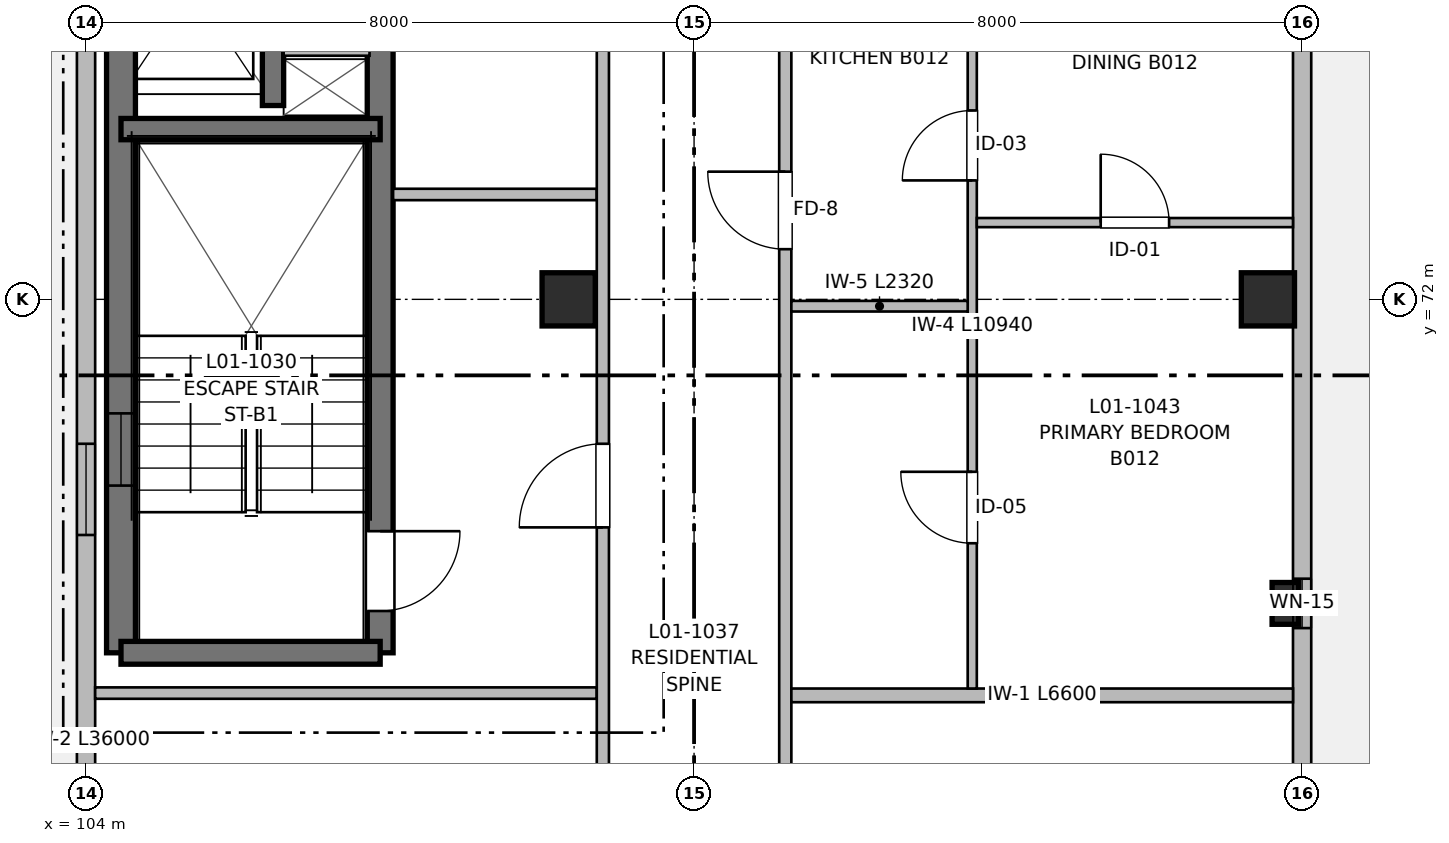
"""IFC4 building model, lengths in metres.
Left out: names, types, materials, properties, quantities, classifications, styles, units other than length and angle.
Written with IfcOpenShell. Run it as: python <this file> out.ifc"""

import sys

from ifc_helpers import new_model, si_unit, direction, frame, frame_2d, origin, origin_2d, place, context, subcontext, project, spatial, rectangle, extrude, element, fill, save


model = new_model("IFC4")
c1 = context("Model", 3, precision=1e-05, world=origin(), true_north=direction((0.0, 1.0)))
c2 = subcontext(c1, "Body", "Model", "MODEL_VIEW")
j1 = project(units=[si_unit("LENGTHUNIT", "METRE"), si_unit("PLANEANGLEUNIT", "RADIAN")], contexts=[c1])
p1 = place(None, origin())
s1 = spatial("IfcSite", under=j1, at=p1, CompositionType="ELEMENT")
p2 = place(p1, origin())
s2 = spatial("IfcBuilding", under=s1, at=p2, CompositionType="ELEMENT")
p3 = place(p2, frame((0.0, 0.0, 4.16)))
s3 = spatial("IfcBuildingStorey", under=s2, at=p3, CompositionType="ELEMENT", Elevation=4.16)
for number, where, z_axis, x_axis in (
    (1, (110.35, 72.0, 0.0), (0.0, 0.0, 1.0), (1.0, 0.0, 0.0)),
    (2, (119.55, 72.0, 0.0), (0.0, 0.0, 1.0), (1.0, 0.0, 0.0)),
):
    element("IfcColumn", number, at=place(p3, frame(where, z_axis=z_axis, x_axis=x_axis)), inside=s3, PredefinedType="COLUMN", context=c2, shape_type="SweptSolid", body=[
        extrude(rectangle(XDim=0.7, YDim=0.7, at=origin_2d()), origin(), (0.0, 0.0, 1.0), 3.2),
    ])
p4 = place(p3, frame((119.78, 68.0, 0.0), z_axis=(0.0, 0.0, 1.0), x_axis=(1.0, 0.0, 0.0)))
e3 = element("IfcColumn", 3, at=p4, inside=s3, PredefinedType="PILASTER", context=c2, shape_type="SweptSolid", body=[
    extrude(rectangle(XDim=0.35, YDim=0.55, at=origin_2d()), origin(), (0.0, 0.0, 1.0), 3.2),
])
p5 = place(p3, frame((104.46, 67.35, 0.0), z_axis=(0.0, 0.0, 1.0), x_axis=(0.0, 1.0, 0.0)))
e4 = element("IfcWall", 4, at=p5, inside=s3, PredefinedType="SHEAR", context=c2, shape_type="SweptSolid", body=[
    extrude(rectangle(XDim=12.45, YDim=0.38, at=frame_2d((6.225, 0.0))), origin(), (0.0, 0.0, 1.0), 3.2),
])
p6 = place(p5, frame((2.2, 0.0, 0.97)))
e5 = element("IfcOpeningElement", 5, at=p6, cuts=e4, PredefinedType="OPENING", context=c2, shape_type="SweptSolid", body=[
    extrude(rectangle(XDim=0.95, YDim=1.25, at=frame_2d((0.475, 0.625))), frame((0.0, 0.2, 0.0), z_axis=(0.0, -1.0, 0.0), x_axis=(1.0, 0.0, 0.0)), (0.0, 0.0, 1.0), 0.4),
])
p7 = place(p3, frame((107.87, 79.8, 0.0), z_axis=(0.0, 0.0, 1.0), x_axis=(0.0, -1.0, 0.0)))
e6 = element("IfcWall", 6, at=p7, inside=s3, PredefinedType="SHEAR", context=c2, shape_type="SweptSolid", body=[
    extrude(rectangle(XDim=12.45, YDim=0.34, at=frame_2d((6.225, 0.0))), origin(), (0.0, 0.0, 1.0), 3.2),
])
p8 = place(p7, frame((10.85, 0.0, 0.0)))
e7 = element("IfcOpeningElement", 7, at=p8, cuts=e6, PredefinedType="OPENING", context=c2, shape_type="SweptSolid", body=[
    extrude(rectangle(XDim=1.05, YDim=2.15, at=frame_2d((0.525, 1.075))), frame((0.0, 0.18, 0.0), z_axis=(0.0, -1.0, 0.0), x_axis=(1.0, 0.0, 0.0)), (0.0, 0.0, 1.0), 0.36),
])
p9 = place(p3, frame((107.87, 67.35, 0.0), z_axis=(0.0, 0.0, 1.0), x_axis=(-1.0, 0.0, 0.0)))
e8 = element("IfcWall", 8, at=p9, inside=s3, PredefinedType="SHEAR", context=c2, shape_type="SweptSolid", body=[
    extrude(rectangle(XDim=3.41, YDim=0.3, at=frame_2d((1.705, 0.0))), origin(), (0.0, 0.0, 1.0), 3.2),
])
p10 = place(p3, frame((104.46, 74.24, 0.0), z_axis=(0.0, 0.0, 1.0), x_axis=(1.0, 0.0, 0.0)))
e9 = element("IfcWall", 9, at=p10, inside=s3, PredefinedType="SHEAR", context=c2, shape_type="SweptSolid", body=[
    extrude(rectangle(XDim=3.41, YDim=0.28, at=frame_2d((1.705, 0.0))), origin(), (0.0, 0.0, 1.0), 3.2),
])
p11 = place(p3, frame((106.46, 74.55, 0.0), z_axis=(0.0, 0.0, 1.0), x_axis=(0.0, 1.0, 0.0)))
e10 = element("IfcWall", 10, at=p11, inside=s3, PredefinedType="SHEAR", context=c2, shape_type="SweptSolid", body=[
    extrude(rectangle(XDim=5.25, YDim=0.28, at=frame_2d((2.625, 0.0))), origin(), (0.0, 0.0, 1.0), 3.2),
])
p12 = place(p11, frame((1.15, 0.0, 0.0)))
e11 = element("IfcOpeningElement", 11, at=p12, cuts=e10, PredefinedType="OPENING", context=c2, shape_type="SweptSolid", body=[
    extrude(rectangle(XDim=1.0, YDim=2.15, at=frame_2d((0.5, 1.075))), frame((0.0, 0.15, 0.0), z_axis=(0.0, -1.0, 0.0), x_axis=(1.0, 0.0, 0.0)), (0.0, 0.0, 1.0), 0.3),
])
p13 = place(p11, frame((3.85, 0.0, 0.0)))
e12 = element("IfcOpeningElement", 12, at=p13, cuts=e10, PredefinedType="OPENING", context=c2, shape_type="SweptSolid", body=[
    extrude(rectangle(XDim=0.9, YDim=2.15, at=frame_2d((0.45, 1.075))), frame((0.0, 0.15, 0.0), z_axis=(0.0, -1.0, 0.0), x_axis=(1.0, 0.0, 0.0)), (0.0, 0.0, 1.0), 0.3),
])
p14 = place(p3, frame((106.6, 75.28, 0.0), z_axis=(0.0, 0.0, 1.0), x_axis=(1.0, 0.0, 0.0)))
e13 = element("IfcWall", 13, at=p14, inside=s3, PredefinedType="PARTITIONING", context=c2, shape_type="SweptSolid", body=[
    extrude(rectangle(XDim=1.13, YDim=0.15, at=frame_2d((0.565, 0.0))), origin(), (0.0, 0.0, 1.0), 2.95),
])
p15 = place(p3, frame((120.0, 88.0, 0.0), z_axis=(0.0, 0.0, 1.0), x_axis=(0.0, -1.0, 0.0)))
e14 = element("IfcWall", 14, at=p15, inside=s3, PredefinedType="SOLIDWALL", context=c2, shape_type="SweptSolid", body=[
    extrude(rectangle(XDim=32.0, YDim=0.24, at=frame_2d((16.0, 0.0))), origin(), (0.0, 0.0, 1.0), 2.98),
])
p16 = place(p15, frame((2.0, 0.0, 0.0)))
e15 = element("IfcOpeningElement", 15, at=p16, cuts=e14, PredefinedType="OPENING", context=c2, shape_type="SweptSolid", body=[
    extrude(rectangle(XDim=1.2, YDim=2.2, at=frame_2d((0.6, 1.1))), frame((0.0, 0.13, 0.0), z_axis=(0.0, -1.0, 0.0), x_axis=(1.0, 0.0, 0.0)), (0.0, 0.0, 1.0), 0.26),
])
p17 = place(p15, frame((11.4, 0.0, 0.9)))
e16 = element("IfcOpeningElement", 16, at=p17, cuts=e14, PredefinedType="OPENING", context=c2, shape_type="SweptSolid", body=[
    extrude(rectangle(XDim=1.2, YDim=1.05, at=frame_2d((0.6, 0.525))), frame((0.0, 0.13, 0.0), z_axis=(0.0, -1.0, 0.0), x_axis=(1.0, 0.0, 0.0)), (0.0, 0.0, 1.0), 0.26),
])
p18 = place(p15, frame((19.675, 0.0, 0.9)))
e17 = element("IfcOpeningElement", 17, at=p18, cuts=e14, PredefinedType="OPENING", context=c2, shape_type="SweptSolid", body=[
    extrude(rectangle(XDim=0.65, YDim=0.95, at=frame_2d((0.325, 0.475))), frame((0.0, 0.13, 0.0), z_axis=(0.0, -1.0, 0.0), x_axis=(1.0, 0.0, 0.0)), (0.0, 0.0, 1.0), 0.26),
])
p19 = place(p15, frame((27.45, 0.0, 0.62)))
e18 = element("IfcOpeningElement", 18, at=p19, cuts=e14, PredefinedType="OPENING", context=c2, shape_type="SweptSolid", body=[
    extrude(rectangle(XDim=1.1, YDim=1.6, at=frame_2d((0.55, 0.8))), frame((0.0, 0.13, 0.0), z_axis=(0.0, -1.0, 0.0), x_axis=(1.0, 0.0, 0.0)), (0.0, 0.0, 1.0), 0.26),
])
p20 = place(p15, frame((6.299, 0.0, 0.87)))
e19 = element("IfcOpeningElement", 19, at=p20, cuts=e14, PredefinedType="OPENING", context=c2, shape_type="SweptSolid", body=[
    extrude(rectangle(XDim=1.25, YDim=1.35, at=frame_2d((0.625, 0.675))), frame((0.0, 0.13, 0.0), z_axis=(0.0, -1.0, 0.0), x_axis=(1.0, 0.0, 0.0)), (0.0, 0.0, 1.0), 0.26),
])
p21 = place(p3, frame((104.0, 56.0, 0.0), z_axis=(0.0, 0.0, 1.0), x_axis=(0.0, 1.0, 0.0)))
e20 = element("IfcWall", 20, at=p21, inside=s3, PredefinedType="SOLIDWALL", context=c2, shape_type="SweptSolid", body=[
    extrude(rectangle(XDim=36.0, YDim=0.24, at=frame_2d((18.0, 0.0))), origin(), (0.0, 0.0, 1.0), 2.98),
])
p22 = place(p21, frame((3.9, 0.0, 0.0)))
e21 = element("IfcOpeningElement", 21, at=p22, cuts=e20, PredefinedType="OPENING", context=c2, shape_type="SweptSolid", body=[
    extrude(rectangle(XDim=1.2, YDim=2.2, at=frame_2d((0.6, 1.1))), frame((0.0, 0.13, 0.0), z_axis=(0.0, -1.0, 0.0), x_axis=(1.0, 0.0, 0.0)), (0.0, 0.0, 1.0), 0.26),
])
p23 = place(p21, frame((5.8, 0.0, 0.72)))
e22 = element("IfcOpeningElement", 22, at=p23, cuts=e20, PredefinedType="OPENING", context=c2, shape_type="SweptSolid", body=[
    extrude(rectangle(XDim=1.7, YDim=1.5, at=frame_2d((0.85, 0.75))), frame((0.0, 0.13, 0.0), z_axis=(0.0, -1.0, 0.0), x_axis=(1.0, 0.0, 0.0)), (0.0, 0.0, 1.0), 0.26),
])
p24 = place(p21, frame((12.9, 0.0, 0.9)))
e23 = element("IfcOpeningElement", 23, at=p24, cuts=e20, PredefinedType="OPENING", context=c2, shape_type="SweptSolid", body=[
    extrude(rectangle(XDim=1.2, YDim=1.05, at=frame_2d((0.6, 0.525))), frame((0.0, 0.13, 0.0), z_axis=(0.0, -1.0, 0.0), x_axis=(1.0, 0.0, 0.0)), (0.0, 0.0, 1.0), 0.26),
])
p25 = place(p21, frame((22.175, 0.0, 0.9)))
e24 = element("IfcOpeningElement", 24, at=p25, cuts=e20, PredefinedType="OPENING", context=c2, shape_type="SweptSolid", body=[
    extrude(rectangle(XDim=0.65, YDim=0.95, at=frame_2d((0.325, 0.475))), frame((0.0, 0.13, 0.0), z_axis=(0.0, -1.0, 0.0), x_axis=(1.0, 0.0, 0.0)), (0.0, 0.0, 1.0), 0.26),
])
p26 = place(p21, frame((30.95, 0.0, 0.62)))
e25 = element("IfcOpeningElement", 25, at=p26, cuts=e20, PredefinedType="OPENING", context=c2, shape_type="SweptSolid", body=[
    extrude(rectangle(XDim=1.1, YDim=1.6, at=frame_2d((0.55, 0.8))), frame((0.0, 0.13, 0.0), z_axis=(0.0, -1.0, 0.0), x_axis=(1.0, 0.0, 0.0)), (0.0, 0.0, 1.0), 0.26),
])
p27 = place(p3, frame((104.12, 66.82, 0.0), z_axis=(0.0, 0.0, 1.0), x_axis=(1.0, 0.0, 0.0)))
e26 = element("IfcWall", 26, at=p27, inside=s3, PredefinedType="PARTITIONING", context=c2, shape_type="SweptSolid", body=[
    extrude(rectangle(XDim=6.6, YDim=0.15, at=frame_2d((3.3, 0.0))), origin(), (0.0, 0.0, 1.0), 2.935),
])
p28 = place(p3, frame((108.04, 73.38, 0.0), z_axis=(0.0, 0.0, 1.0), x_axis=(1.0, 0.0, 0.0)))
e27 = element("IfcWall", 27, at=p28, inside=s3, PredefinedType="PARTITIONING", context=c2, shape_type="SweptSolid", body=[
    extrude(rectangle(XDim=2.68, YDim=0.15, at=frame_2d((1.34, 0.0))), origin(), (0.0, 0.0, 1.0), 2.935),
])
p29 = place(p3, frame((110.8, 56.18, 0.0), z_axis=(0.0, 0.0, 1.0), x_axis=(0.0, 1.0, 0.0)))
e28 = element("IfcWall", 28, at=p29, inside=s3, PredefinedType="PARTITIONING", context=c2, shape_type="SweptSolid", body=[
    extrude(rectangle(XDim=50.62, YDim=0.16, at=frame_2d((25.31, 0.0))), origin(), (0.0, 0.0, 1.0), 2.935),
])
p30 = place(p29, frame((12.82, 0.0, 0.0)))
e29 = element("IfcOpeningElement", 29, at=p30, cuts=e28, PredefinedType="OPENING", context=c2, shape_type="SweptSolid", body=[
    extrude(rectangle(XDim=1.1, YDim=2.15, at=frame_2d((0.55, 1.075))), frame((0.0, 0.09, 0.0), z_axis=(0.0, -1.0, 0.0), x_axis=(1.0, 0.0, 0.0)), (0.0, 0.0, 1.0), 0.18),
])
p31 = place(p29, frame((19.22, 0.0, 0.0)))
e30 = element("IfcOpeningElement", 30, at=p31, cuts=e28, PredefinedType="OPENING", context=c2, shape_type="SweptSolid", body=[
    extrude(rectangle(XDim=1.6, YDim=2.15, at=frame_2d((0.8, 1.075))), frame((0.0, 0.09, 0.0), z_axis=(0.0, -1.0, 0.0), x_axis=(1.0, 0.0, 0.0)), (0.0, 0.0, 1.0), 0.18),
])
p32 = place(p29, frame((1.8, 0.0, 0.0)))
e31 = element("IfcOpeningElement", 31, at=p32, cuts=e28, PredefinedType="OPENING", context=c2, shape_type="SweptSolid", body=[
    extrude(rectangle(XDim=0.96, YDim=2.15, at=frame_2d((0.48, 1.075))), frame((0.0, 0.09, 0.0), z_axis=(0.0, -1.0, 0.0), x_axis=(1.0, 0.0, 0.0)), (0.0, 0.0, 1.0), 0.18),
])
p33 = place(p29, frame((32.725, 0.0, 0.0)))
e32 = element("IfcOpeningElement", 32, at=p33, cuts=e28, PredefinedType="OPENING", context=c2, shape_type="SweptSolid", body=[
    extrude(rectangle(XDim=0.98, YDim=2.15, at=frame_2d((0.49, 1.075))), frame((0.0, 0.09, 0.0), z_axis=(0.0, -1.0, 0.0), x_axis=(1.0, 0.0, 0.0)), (0.0, 0.0, 1.0), 0.18),
])
p34 = place(p29, frame((40.935, 0.0, 0.0)))
e33 = element("IfcOpeningElement", 33, at=p34, cuts=e28, PredefinedType="OPENING", context=c2, shape_type="SweptSolid", body=[
    extrude(rectangle(XDim=0.98, YDim=2.15, at=frame_2d((0.49, 1.075))), frame((0.0, 0.09, 0.0), z_axis=(0.0, -1.0, 0.0), x_axis=(1.0, 0.0, 0.0)), (0.0, 0.0, 1.0), 0.18),
])
p35 = place(p3, frame((113.2, 56.18, 0.0), z_axis=(0.0, 0.0, 1.0), x_axis=(0.0, 1.0, 0.0)))
e34 = element("IfcWall", 34, at=p35, inside=s3, PredefinedType="PARTITIONING", context=c2, shape_type="SweptSolid", body=[
    extrude(rectangle(XDim=50.62, YDim=0.16, at=frame_2d((25.31, 0.0))), origin(), (0.0, 0.0, 1.0), 2.935),
])
p36 = place(p35, frame((4.51, 0.0, 0.0)))
e35 = element("IfcOpeningElement", 35, at=p36, cuts=e34, PredefinedType="OPENING", context=c2, shape_type="SweptSolid", body=[
    extrude(rectangle(XDim=1.5, YDim=2.2, at=frame_2d((0.75, 1.1))), frame((0.0, 0.09, 0.0), z_axis=(0.0, -1.0, 0.0), x_axis=(1.0, 0.0, 0.0)), (0.0, 0.0, 1.0), 0.18),
])
p37 = place(p35, frame((16.48, 0.0, 0.0)))
e36 = element("IfcOpeningElement", 36, at=p37, cuts=e34, PredefinedType="OPENING", context=c2, shape_type="SweptSolid", body=[
    extrude(rectangle(XDim=1.02, YDim=2.15, at=frame_2d((0.51, 1.075))), frame((0.0, 0.09, 0.0), z_axis=(0.0, -1.0, 0.0), x_axis=(1.0, 0.0, 0.0)), (0.0, 0.0, 1.0), 0.18),
])
p38 = place(p35, frame((28.53, 0.0, 0.0)))
e37 = element("IfcOpeningElement", 37, at=p38, cuts=e34, PredefinedType="OPENING", context=c2, shape_type="SweptSolid", body=[
    extrude(rectangle(XDim=0.98, YDim=2.15, at=frame_2d((0.49, 1.075))), frame((0.0, 0.09, 0.0), z_axis=(0.0, -1.0, 0.0), x_axis=(1.0, 0.0, 0.0)), (0.0, 0.0, 1.0), 0.18),
])
p39 = place(p35, frame((42.88, 0.0, 0.0)))
e38 = element("IfcOpeningElement", 38, at=p39, cuts=e34, PredefinedType="OPENING", context=c2, shape_type="SweptSolid", body=[
    extrude(rectangle(XDim=0.98, YDim=2.15, at=frame_2d((0.49, 1.075))), frame((0.0, 0.09, 0.0), z_axis=(0.0, -1.0, 0.0), x_axis=(1.0, 0.0, 0.0)), (0.0, 0.0, 1.0), 0.18),
])
p40 = place(p3, frame((113.28, 66.79, 0.0), z_axis=(0.0, 0.0, 1.0), x_axis=(1.0, 0.0, 0.0)))
e39 = element("IfcWall", 39, at=p40, inside=s3, PredefinedType="PARTITIONING", context=c2, shape_type="SweptSolid", body=[
    extrude(rectangle(XDim=6.6, YDim=0.18, at=frame_2d((3.3, 0.0))), origin(), (0.0, 0.0, 1.0), 2.935),
])
p41 = place(p3, frame((115.66, 66.88, 0.0), z_axis=(0.0, 0.0, 1.0), x_axis=(0.0, 1.0, 0.0)))
e40 = element("IfcWall", 40, at=p41, inside=s3, PredefinedType="PARTITIONING", context=c2, shape_type="SweptSolid", body=[
    extrude(rectangle(XDim=10.94, YDim=0.12, at=frame_2d((5.47, 0.0))), origin(), (0.0, 0.0, 1.0), 2.935),
])
p42 = place(p41, frame((1.911, 0.0, 0.0)))
e41 = element("IfcOpeningElement", 41, at=p42, cuts=e40, PredefinedType="OPENING", context=c2, shape_type="SweptSolid", body=[
    extrude(rectangle(XDim=0.94, YDim=2.1, at=frame_2d((0.47, 1.05))), frame((0.0, 0.07, 0.0), z_axis=(0.0, -1.0, 0.0), x_axis=(1.0, 0.0, 0.0)), (0.0, 0.0, 1.0), 0.14),
])
p43 = place(p41, frame((6.685, 0.0, 0.0)))
e42 = element("IfcOpeningElement", 42, at=p43, cuts=e40, PredefinedType="OPENING", context=c2, shape_type="SweptSolid", body=[
    extrude(rectangle(XDim=0.92, YDim=2.1, at=frame_2d((0.46, 1.05))), frame((0.0, 0.07, 0.0), z_axis=(0.0, -1.0, 0.0), x_axis=(1.0, 0.0, 0.0)), (0.0, 0.0, 1.0), 0.14),
])
p44 = place(p3, frame((113.28, 71.91, 0.0), z_axis=(0.0, 0.0, 1.0), x_axis=(1.0, 0.0, 0.0)))
e43 = element("IfcWall", 43, at=p44, inside=s3, PredefinedType="PARTITIONING", context=c2, shape_type="SweptSolid", body=[
    extrude(rectangle(XDim=2.32, YDim=0.14, at=frame_2d((1.16, 0.0))), origin(), (0.0, 0.0, 1.0), 2.53),
])
p45 = place(p3, frame((115.72, 73.01, 0.0), z_axis=(0.0, 0.0, 1.0), x_axis=(1.0, 0.0, 0.0)))
e44 = element("IfcWall", 44, at=p45, inside=s3, PredefinedType="PARTITIONING", context=c2, shape_type="SweptSolid", body=[
    extrude(rectangle(XDim=4.16, YDim=0.12, at=frame_2d((2.08, 0.0))), origin(), (0.0, 0.0, 1.0), 2.935),
])
p46 = place(p45, frame((1.63, 0.0, 0.0)))
e45 = element("IfcOpeningElement", 45, at=p46, cuts=e44, PredefinedType="OPENING", context=c2, shape_type="SweptSolid", body=[
    extrude(rectangle(XDim=0.9, YDim=2.1, at=frame_2d((0.45, 1.05))), frame((0.0, 0.07, 0.0), z_axis=(0.0, -1.0, 0.0), x_axis=(1.0, 0.0, 0.0)), (0.0, 0.0, 1.0), 0.14),
])
p47 = place(p8, origin())
e46 = element("IfcDoor", 46, at=p47, inside=s3, OperationType="SINGLE_SWING_LEFT", PredefinedType="DOOR", context=c2, shape_type="SweptSolid", body=[
    extrude(rectangle(XDim=1.05, YDim=2.15, at=frame_2d((0.525, 1.075))), frame((0.0, 0.025, 0.0), z_axis=(0.0, -1.0, 0.0), x_axis=(1.0, 0.0, 0.0)), (0.0, 0.0, 1.0), 0.05),
])
fill(e7, e46)
p48 = place(p6, origin())
e47 = element("IfcWindow", 47, at=p48, inside=s3, PartitioningType="SINGLE_PANEL", PredefinedType="WINDOW", context=c2, shape_type="SweptSolid", body=[
    extrude(rectangle(XDim=0.95, YDim=1.25, at=frame_2d((0.475, 0.625))), frame((0.0, 0.03, 0.0), z_axis=(0.0, -1.0, 0.0), x_axis=(1.0, 0.0, 0.0)), (0.0, 0.0, 1.0), 0.06),
])
fill(e5, e47)
p49 = place(p18, origin())
e48 = element("IfcWindow", 48, at=p49, inside=s3, PartitioningType="SINGLE_PANEL", PredefinedType="WINDOW", context=c2, shape_type="SweptSolid", body=[
    extrude(rectangle(XDim=0.65, YDim=0.95, at=frame_2d((0.325, 0.475))), frame((0.0, 0.03, 0.0), z_axis=(0.0, -1.0, 0.0), x_axis=(1.0, 0.0, 0.0)), (0.0, 0.0, 1.0), 0.06),
])
fill(e17, e48)
p50 = place(p24, origin())
e49 = element("IfcWindow", 49, at=p50, inside=s3, PartitioningType="SINGLE_PANEL", PredefinedType="WINDOW", context=c2, shape_type="SweptSolid", body=[
    extrude(rectangle(XDim=1.2, YDim=1.05, at=frame_2d((0.6, 0.525))), frame((0.0, 0.03, 0.0), z_axis=(0.0, -1.0, 0.0), x_axis=(1.0, 0.0, 0.0)), (0.0, 0.0, 1.0), 0.06),
])
fill(e23, e49)
p51 = place(p30, origin())
e50 = element("IfcDoor", 50, at=p51, inside=s3, OperationType="SINGLE_SWING_LEFT", PredefinedType="DOOR", context=c2, shape_type="SweptSolid", body=[
    extrude(rectangle(XDim=1.1, YDim=2.15, at=frame_2d((0.55, 1.075))), frame((0.0, 0.025, 0.0), z_axis=(0.0, -1.0, 0.0), x_axis=(1.0, 0.0, 0.0)), (0.0, 0.0, 1.0), 0.05),
])
fill(e29, e50)
p52 = place(p42, origin())
e51 = element("IfcDoor", 51, at=p52, inside=s3, OperationType="SINGLE_SWING_RIGHT", PredefinedType="DOOR", context=c2, shape_type="SweptSolid", body=[
    extrude(rectangle(XDim=0.94, YDim=2.1, at=frame_2d((0.47, 1.05))), frame((0.0, 0.025, 0.0), z_axis=(0.0, -1.0, 0.0), x_axis=(1.0, 0.0, 0.0)), (0.0, 0.0, 1.0), 0.05),
])
fill(e41, e51)
p53 = place(p43, origin())
e52 = element("IfcDoor", 52, at=p53, inside=s3, OperationType="SINGLE_SWING_LEFT", PredefinedType="DOOR", context=c2, shape_type="SweptSolid", body=[
    extrude(rectangle(XDim=0.92, YDim=2.1, at=frame_2d((0.46, 1.05))), frame((0.0, 0.025, 0.0), z_axis=(0.0, -1.0, 0.0), x_axis=(1.0, 0.0, 0.0)), (0.0, 0.0, 1.0), 0.05),
])
fill(e42, e52)
p54 = place(p37, origin())
e53 = element("IfcDoor", 53, at=p54, inside=s3, OperationType="SINGLE_SWING_RIGHT", PredefinedType="DOOR", context=c2, shape_type="SweptSolid", body=[
    extrude(rectangle(XDim=1.02, YDim=2.15, at=frame_2d((0.51, 1.075))), frame((0.0, 0.025, 0.0), z_axis=(0.0, -1.0, 0.0), x_axis=(1.0, 0.0, 0.0)), (0.0, 0.0, 1.0), 0.05),
])
fill(e36, e53)
p55 = place(p46, origin())
e54 = element("IfcDoor", 54, at=p55, inside=s3, OperationType="SINGLE_SWING_LEFT", PredefinedType="DOOR", context=c2, shape_type="SweptSolid", body=[
    extrude(rectangle(XDim=0.9, YDim=2.1, at=frame_2d((0.45, 1.05))), frame((0.0, 0.025, 0.0), z_axis=(0.0, -1.0, 0.0), x_axis=(1.0, 0.0, 0.0)), (0.0, 0.0, 1.0), 0.05),
])
fill(e45, e54)
save(model, sys.argv[1])
